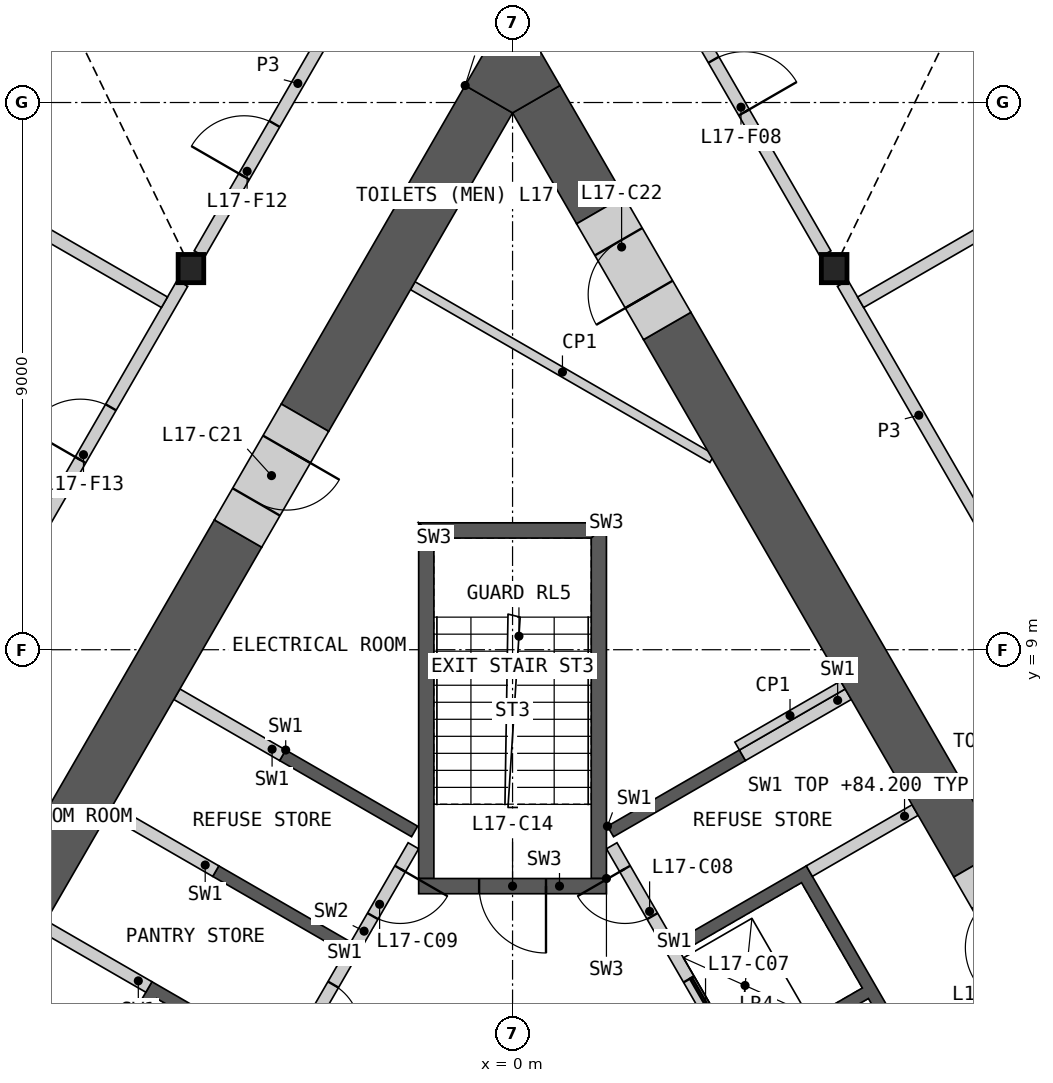
"""IFC4 building model, lengths in metres.
Left out: names, types, materials, properties, quantities, classifications, styles, units other than length and angle.
Written with IfcOpenShell. Run it as: python <this file> out.ifc"""

import sys

from ifc_helpers import new_model, si_unit, direction, frame, frame_2d, origin, origin_2d, place, context, subcontext, project, spatial, polyline, rectangle, i_section, outline, extrude, element, fill, save


model = new_model("IFC4")
c1 = context("Model", 3, precision=1e-05, world=origin(), true_north=direction((0.0, 1.0)))
c2 = subcontext(c1, "Body", "Model", "MODEL_VIEW")
j1 = project(units=[si_unit("LENGTHUNIT", "METRE"), si_unit("PLANEANGLEUNIT", "RADIAN")], contexts=[c1])
p1 = place(None, origin())
s1 = spatial("IfcSite", under=j1, at=p1, CompositionType="ELEMENT")
p2 = place(p1, origin())
s2 = spatial("IfcBuilding", under=s1, at=p2, CompositionType="ELEMENT")
p3 = place(p2, frame((0.0, 0.0, 80.4)))
s3 = spatial("IfcBuildingStorey", under=s2, at=p3, CompositionType="ELEMENT", Elevation=80.4)
for number, where, z_axis, x_axis in (
    (1, (-5.289, 15.269, 0.0), (0.0, 0.0, 1.0), (1.0, 0.0, 0.0)),
    (2, (5.289, 15.269, 0.0), (0.0, 0.0, 1.0), (1.0, 0.0, 0.0)),
):
    element("IfcColumn", number, at=place(p3, frame(where, z_axis=z_axis, x_axis=x_axis)), inside=s3, PredefinedType="COLUMN", context=c2, shape_type="SweptSolid", body=[
        extrude(i_section(OverallWidth=0.421, OverallDepth=0.465, WebThickness=0.045, FlangeThickness=0.072, at=origin_2d()), origin(), (0.0, 0.0, 1.0), 4.2),
    ])
p4 = place(p3, origin())
e3 = element("IfcWall", 3, at=p4, inside=s3, PredefinedType="SHEAR", context=c2, shape_type="SweptSolid", body=[
    extrude(outline(polyline([(1.561, 6.097), (3.731, 7.35), (3.831, 7.177), (1.66, 5.924), (1.561, 6.097)])), origin(), (0.0, 0.0, 1.0), 3.8),
])
p5 = place(p3, origin())
e4 = element("IfcWall", 4, at=p5, inside=s3, PredefinedType="SHEAR", context=c2, shape_type="SweptSolid", body=[
    extrude(outline(polyline([(2.66, 4.192), (4.831, 5.445), (8.231, -0.444), (6.061, -1.697), (5.96, -1.524), (7.952, -0.374), (6.952, 1.358), (4.96, 0.208), (4.861, 0.381), (6.852, 1.531), (5.852, 3.263), (3.861, 2.113), (3.76, 2.287), (5.752, 3.437), (4.752, 5.169), (2.76, 4.019), (2.66, 4.192)])), origin(), (0.0, 0.0, 1.0), 3.8),
])
p6 = place(p3, frame((5.817, -1.476, 0.0), z_axis=(0.0, 0.0, 1.0), x_axis=(-0.500002616675, 0.866023893041, 0.0)))
e5 = element("IfcWall", 5, at=p6, inside=s3, PredefinedType="SOLIDWALL", context=c2, shape_type="SweptSolid", body=[
    extrude(rectangle(XDim=8.373, YDim=0.2, at=frame_2d((4.187, 0.0))), origin(), (0.0, 0.0, 1.0), 3.8),
])
p7 = place(p6, frame((0.337, 0.0, 0.0)))
e6 = element("IfcOpeningElement", 6, at=p7, cuts=e5, PredefinedType="OPENING", context=c2, shape_type="SweptSolid", body=[
    extrude(rectangle(XDim=1.1, YDim=2.1, at=frame_2d((0.55, 1.05))), frame((0.0, 0.11, 0.0), z_axis=(0.0, -1.0, 0.0), x_axis=(1.0, 0.0, 0.0)), (0.0, 0.0, 1.0), 0.22),
])
p8 = place(p6, frame((2.537, 0.0, 0.0)))
e7 = element("IfcOpeningElement", 7, at=p8, cuts=e5, PredefinedType="OPENING", context=c2, shape_type="SweptSolid", body=[
    extrude(rectangle(XDim=1.1, YDim=2.1, at=frame_2d((0.55, 1.05))), frame((0.0, 0.11, 0.0), z_axis=(0.0, -1.0, 0.0), x_axis=(1.0, 0.0, 0.0)), (0.0, 0.0, 1.0), 0.22),
])
p9 = place(p6, frame((4.737, 0.0, 0.0)))
e8 = element("IfcOpeningElement", 8, at=p9, cuts=e5, PredefinedType="OPENING", context=c2, shape_type="SweptSolid", body=[
    extrude(rectangle(XDim=1.1, YDim=2.1, at=frame_2d((0.55, 1.05))), frame((0.0, 0.11, 0.0), z_axis=(0.0, -1.0, 0.0), x_axis=(1.0, 0.0, 0.0)), (0.0, 0.0, 1.0), 0.22),
])
p10 = place(p6, frame((7.037, 0.0, 0.0)))
e9 = element("IfcOpeningElement", 9, at=p10, cuts=e5, PredefinedType="OPENING", context=c2, shape_type="SweptSolid", body=[
    extrude(rectangle(XDim=0.9, YDim=2.1, at=frame_2d((0.45, 1.05))), frame((0.0, 0.11, 0.0), z_axis=(0.0, -1.0, 0.0), x_axis=(1.0, 0.0, 0.0)), (0.0, 0.0, 1.0), 0.22),
])
p11 = place(p3, frame((4.881, 5.358, 0.0), z_axis=(0.0, 0.0, 1.0), x_axis=(0.866035824272, 0.499981950752, 0.0)))
e10 = element("IfcWall", 10, at=p11, inside=s3, PredefinedType="SHEAR", context=c2, shape_type="SweptSolid", body=[
    extrude(rectangle(XDim=2.009, YDim=0.2, at=frame_2d((1.004, 0.0))), origin(), (0.0, 0.0, 1.0), 3.8),
])
p12 = place(p3, frame((3.781, 7.263, 0.0), z_axis=(0.0, 0.0, 1.0), x_axis=(0.865983199114, 0.50007309351, 0.0)))
e11 = element("IfcWall", 11, at=p12, inside=s3, PredefinedType="SHEAR", context=c2, shape_type="SweptSolid", body=[
    extrude(rectangle(XDim=2.009, YDim=0.2, at=frame_2d((1.004, 0.0))), origin(), (0.0, 0.0, 1.0), 3.8),
])
p13 = place(p3, origin())
e12 = element("IfcWall", 12, at=p13, inside=s3, PredefinedType="SHEAR", context=c2, shape_type="SweptSolid", body=[
    extrude(outline(polyline([(-4.96, 0.208), (-7.131, 1.461), (-5.931, 3.54), (-3.76, 2.287), (-3.861, 2.113), (-5.852, 3.263), (-6.852, 1.531), (-4.861, 0.381), (-4.96, 0.208)])), origin(), (0.0, 0.0, 1.0), 3.8),
])
p14 = place(p3, origin())
e13 = element("IfcWall", 13, at=p14, inside=s3, PredefinedType="SHEAR", context=c2, shape_type="SweptSolid", body=[
    extrude(outline(polyline([(-2.76, 4.019), (-4.931, 5.272), (-4.831, 5.445), (-2.66, 4.192), (-2.76, 4.019)])), origin(), (0.0, 0.0, 1.0), 3.8),
])
p15 = place(p3, origin())
e14 = element("IfcWall", 14, at=p15, inside=s3, PredefinedType="SHEAR", context=c2, shape_type="SweptSolid", body=[
    extrude(outline(polyline([(-3.731, 7.35), (-1.561, 6.097), (-1.66, 5.924), (-3.831, 7.177), (-3.731, 7.35)])), origin(), (0.0, 0.0, 1.0), 3.8),
])
p16 = place(p3, frame((-1.631, 5.776, 0.0), z_axis=(0.0, 0.0, 1.0), x_axis=(-0.499992876559, -0.866029516466, 0.0)))
e15 = element("IfcWall", 15, at=p16, inside=s3, PredefinedType="SOLIDWALL", context=c2, shape_type="SweptSolid", body=[
    extrude(rectangle(XDim=6.486, YDim=0.2, at=frame_2d((3.243, 0.0))), origin(), (0.0, 0.0, 1.0), 3.8),
])
p17 = place(p16, frame((0.437, 0.0, 0.0)))
e16 = element("IfcOpeningElement", 16, at=p17, cuts=e15, PredefinedType="OPENING", context=c2, shape_type="SweptSolid", body=[
    extrude(rectangle(XDim=0.9, YDim=2.1, at=frame_2d((0.45, 1.05))), frame((0.0, 0.11, 0.0), z_axis=(0.0, -1.0, 0.0), x_axis=(1.0, 0.0, 0.0)), (0.0, 0.0, 1.0), 0.22),
])
p18 = place(p16, frame((2.637, 0.0, 0.0)))
e17 = element("IfcOpeningElement", 17, at=p18, cuts=e15, PredefinedType="OPENING", context=c2, shape_type="SweptSolid", body=[
    extrude(rectangle(XDim=0.9, YDim=2.1, at=frame_2d((0.45, 1.05))), frame((0.0, 0.11, 0.0), z_axis=(0.0, -1.0, 0.0), x_axis=(1.0, 0.0, 0.0)), (0.0, 0.0, 1.0), 0.22),
])
p19 = place(p3, frame((-3.781, 7.263, 0.0), z_axis=(0.0, 0.0, 1.0), x_axis=(-0.865983199114, 0.50007309351, 0.0)))
e18 = element("IfcWall", 18, at=p19, inside=s3, PredefinedType="SHEAR", context=c2, shape_type="SweptSolid", body=[
    extrude(rectangle(XDim=2.009, YDim=0.2, at=frame_2d((1.004, 0.0))), origin(), (0.0, 0.0, 1.0), 3.8),
])
p20 = place(p3, frame((-4.881, 5.358, 0.0), z_axis=(0.0, 0.0, 1.0), x_axis=(-0.866035824272, 0.499981950752, 0.0)))
e19 = element("IfcWall", 19, at=p20, inside=s3, PredefinedType="SHEAR", context=c2, shape_type="SweptSolid", body=[
    extrude(rectangle(XDim=2.009, YDim=0.2, at=frame_2d((1.004, 0.0))), origin(), (0.0, 0.0, 1.0), 3.8),
])
p21 = place(p3, frame((-5.981, 3.453, 0.0), z_axis=(0.0, 0.0, 1.0), x_axis=(-0.866013584312, 0.500020471368, 0.0)))
e20 = element("IfcWall", 20, at=p21, inside=s3, PredefinedType="SHEAR", context=c2, shape_type="SweptSolid", body=[
    extrude(rectangle(XDim=2.009, YDim=0.2, at=frame_2d((1.005, 0.0))), origin(), (0.0, 0.0, 1.0), 3.8),
])
p22 = place(p3, origin())
e21 = element("IfcWall", 21, at=p22, inside=s3, PredefinedType="SHEAR", context=c2, shape_type="SweptSolid", body=[
    extrude(outline(polyline([(1.544, 5.237), (1.544, 11.087), (1.294, 10.837), (1.294, 5.237), (1.544, 5.237)])), origin(), (0.0, 0.0, 1.0), 3.8),
])
p23 = place(p3, origin())
e22 = element("IfcWall", 22, at=p23, inside=s3, PredefinedType="SHEAR", context=c2, shape_type="SweptSolid", body=[
    extrude(outline(polyline([(1.544, 11.087), (-1.544, 11.087), (-1.294, 10.837), (1.294, 10.837), (1.544, 11.087)])), origin(), (0.0, 0.0, 1.0), 3.8),
])
p24 = place(p3, origin())
e23 = element("IfcWall", 23, at=p24, inside=s3, PredefinedType="SHEAR", context=c2, shape_type="SweptSolid", body=[
    extrude(outline(polyline([(-1.294, 10.837), (-1.544, 11.087), (-1.544, 5.237), (-1.294, 5.237), (-1.294, 10.837)])), origin(), (0.0, 0.0, 1.0), 3.8),
])
p25 = place(p3, frame((1.544, 5.112, 0.0), z_axis=(0.0, 0.0, 1.0), x_axis=(-1.0, 0.0, 0.0)))
e24 = element("IfcWall", 24, at=p25, inside=s3, PredefinedType="SHEAR", context=c2, shape_type="SweptSolid", body=[
    extrude(rectangle(XDim=3.088, YDim=0.25, at=frame_2d((1.544, 0.0))), origin(), (0.0, 0.0, 1.0), 3.8),
])
p26 = place(p25, frame((0.994, 0.0, 0.0)))
e25 = element("IfcOpeningElement", 25, at=p26, cuts=e24, PredefinedType="OPENING", context=c2, shape_type="SweptSolid", body=[
    extrude(rectangle(XDim=1.1, YDim=2.1, at=frame_2d((0.55, 1.05))), frame((0.0, 0.135, 0.0), z_axis=(0.0, -1.0, 0.0), x_axis=(1.0, 0.0, 0.0)), (0.0, 0.0, 1.0), 0.27),
])
p27 = place(p3, frame((3.693, 7.415, 0.0), z_axis=(0.0, 0.0, 1.0), x_axis=(0.866035824272, 0.499981950752, 0.0)))
e26 = element("IfcWall", 26, at=p27, inside=s3, PredefinedType="PARTITIONING", context=c2, shape_type="SweptSolid", body=[
    extrude(rectangle(XDim=2.009, YDim=0.15, at=frame_2d((1.004, 0.0))), origin(), (0.0, 0.0, 1.0), 3.8),
])
p28 = place(p3, frame((-1.641, 14.987, 0.0), z_axis=(0.0, 0.0, 1.0), x_axis=(0.866033267067, -0.499986380149, 0.0)))
e27 = element("IfcWall", 27, at=p28, inside=s3, PredefinedType="PARTITIONING", context=c2, shape_type="SweptSolid", body=[
    extrude(rectangle(XDim=5.685, YDim=0.15, at=frame_2d((2.843, 0.0))), origin(), (0.0, 0.0, 1.0), 3.8),
])
p29 = place(p3, frame((7.646, 5.486, 0.0), z_axis=(0.0, 0.0, 1.0), x_axis=(-0.499982660725, 0.866035414388, 0.0)))
e28 = element("IfcWall", 28, at=p29, inside=s3, PredefinedType="SHEAR", context=c2, shape_type="SweptSolid", body=[
    extrude(rectangle(XDim=10.206, YDim=0.9, at=frame_2d((5.103, 0.0))), origin(), (0.0, 0.0, 1.0), 3.8),
])
p30 = place(p3, frame((1.443, 16.23, 0.0), z_axis=(0.0, 0.0, 1.0), x_axis=(-0.500026652407, 0.866010015463, 0.0)))
e29 = element("IfcWall", 29, at=p30, inside=s3, PredefinedType="SHEAR", context=c2, shape_type="SweptSolid", body=[
    extrude(rectangle(XDim=2.107, YDim=0.9, at=frame_2d((1.054, 0.0))), origin(), (0.0, 0.0, 1.0), 3.8),
])
p31 = place(p3, frame((-4.514, 10.911, 0.0), z_axis=(0.0, 0.0, 1.0), x_axis=(-0.500006662879, -0.866021556935, 0.0)))
e30 = element("IfcWall", 30, at=p31, inside=s3, PredefinedType="SHEAR", context=c2, shape_type="SweptSolid", body=[
    extrude(rectangle(XDim=7.312, YDim=0.9, at=frame_2d((3.656, 0.0))), origin(), (0.0, 0.0, 1.0), 3.8),
])
p32 = place(p3, frame((-0.39, 18.055, 0.0), z_axis=(0.0, 0.0, 1.0), x_axis=(-0.500006596359, -0.866021595341, 0.0)))
e31 = element("IfcWall", 31, at=p32, inside=s3, PredefinedType="SHEAR", context=c2, shape_type="SweptSolid", body=[
    extrude(rectangle(XDim=6.049, YDim=0.9, at=frame_2d((3.025, 0.0))), origin(), (0.0, 0.0, 1.0), 3.8),
])
p33 = place(p3, origin())
e32 = element("IfcWall", 32, at=p33, inside=s3, PredefinedType="SHEAR", context=c2, shape_type="SweptSolid", body=[
    extrude(outline(polyline([(-0.779, 18.28), (0.0, 19.63), (0.779, 18.28), (0.0, 17.83), (-0.779, 18.28)])), origin(), (0.0, 0.0, 1.0), 3.8),
])
p34 = place(p3, frame((8.747, 3.58, 0.0), z_axis=(0.0, 0.0, 1.0), x_axis=(-0.50002983664, 0.866008176907, 0.0)))
e33 = element("IfcWall", 33, at=p34, inside=s3, PredefinedType="SHEAR", context=c2, shape_type="SweptSolid", body=[
    extrude(rectangle(XDim=2.2, YDim=0.9, at=frame_2d((1.1, 0.0))), origin(), (0.0, 0.0, 1.0), 3.8),
])
p35 = place(p34, frame((0.6, 0.0, 0.0)))
e34 = element("IfcOpeningElement", 34, at=p35, cuts=e33, PredefinedType="OPENING", context=c2, shape_type="SweptSolid", body=[
    extrude(rectangle(XDim=1.0, YDim=2.1, at=frame_2d((0.5, 1.05))), frame((0.0, 0.46, 0.0), z_axis=(0.0, -1.0, 0.0), x_axis=(1.0, 0.0, 0.0)), (0.0, 0.0, 1.0), 0.92),
])
p36 = place(p3, frame((-3.414, 12.816, 0.0), z_axis=(0.0, 0.0, 1.0), x_axis=(-0.50002983664, -0.866008176907, 0.0)))
e35 = element("IfcWall", 35, at=p36, inside=s3, PredefinedType="SHEAR", context=c2, shape_type="SweptSolid", body=[
    extrude(rectangle(XDim=2.2, YDim=0.9, at=frame_2d((1.1, 0.0))), origin(), (0.0, 0.0, 1.0), 3.8),
])
p37 = place(p36, frame((0.6, 0.0, 0.0)))
e36 = element("IfcOpeningElement", 36, at=p37, cuts=e35, PredefinedType="OPENING", context=c2, shape_type="SweptSolid", body=[
    extrude(rectangle(XDim=1.0, YDim=2.1, at=frame_2d((0.5, 1.05))), frame((0.0, 0.46, 0.0), z_axis=(0.0, -1.0, 0.0), x_axis=(1.0, 0.0, 0.0)), (0.0, 0.0, 1.0), 0.92),
])
p38 = place(p3, frame((2.543, 14.325, 0.0), z_axis=(0.0, 0.0, 1.0), x_axis=(-0.50002983664, 0.866008176907, 0.0)))
e37 = element("IfcWall", 37, at=p38, inside=s3, PredefinedType="SHEAR", context=c2, shape_type="SweptSolid", body=[
    extrude(rectangle(XDim=2.2, YDim=0.9, at=frame_2d((1.1, 0.0))), origin(), (0.0, 0.0, 1.0), 3.8),
])
p39 = place(p38, frame((0.6, 0.0, 0.0)))
e38 = element("IfcOpeningElement", 38, at=p39, cuts=e37, PredefinedType="OPENING", context=c2, shape_type="SweptSolid", body=[
    extrude(rectangle(XDim=1.0, YDim=2.1, at=frame_2d((0.5, 1.05))), frame((0.0, 0.46, 0.0), z_axis=(0.0, -1.0, 0.0), x_axis=(1.0, 0.0, 0.0)), (0.0, 0.0, 1.0), 0.92),
])
p40 = place(p3, frame((5.429, 15.026, 0.0), z_axis=(0.0, 0.0, 1.0), x_axis=(0.50001002959, -0.86601961312, 0.0)))
e39 = element("IfcWall", 39, at=p40, inside=s3, PredefinedType="PARTITIONING", context=c2, shape_type="SweptSolid", body=[
    extrude(rectangle(XDim=10.019, YDim=0.2, at=frame_2d((5.009, 0.0))), origin(), (0.0, 0.0, 1.0), 3.8),
])
p41 = place(p40, frame((4.76, 0.0, 0.0)))
e40 = element("IfcOpeningElement", 40, at=p41, cuts=e39, PredefinedType="OPENING", context=c2, shape_type="SweptSolid", body=[
    extrude(rectangle(XDim=1.0, YDim=2.1, at=frame_2d((0.5, 1.05))), frame((0.0, 0.11, 0.0), z_axis=(0.0, -1.0, 0.0), x_axis=(1.0, 0.0, 0.0)), (0.0, 0.0, 1.0), 0.22),
])
p42 = place(p3, frame((-10.439, 6.35, 0.0), z_axis=(0.0, 0.0, 1.0), x_axis=(0.50001002959, 0.86601961312, 0.0)))
e41 = element("IfcWall", 41, at=p42, inside=s3, PredefinedType="PARTITIONING", context=c2, shape_type="SweptSolid", body=[
    extrude(rectangle(XDim=10.019, YDim=0.2, at=frame_2d((5.009, 0.0))), origin(), (0.0, 0.0, 1.0), 3.8),
])
p43 = place(p42, frame((6.664, 0.0, 0.0)))
e42 = element("IfcOpeningElement", 42, at=p43, cuts=e41, PredefinedType="OPENING", context=c2, shape_type="SweptSolid", body=[
    extrude(rectangle(XDim=1.0, YDim=2.1, at=frame_2d((0.5, 1.05))), frame((0.0, 0.11, 0.0), z_axis=(0.0, -1.0, 0.0), x_axis=(1.0, 0.0, 0.0)), (0.0, 0.0, 1.0), 0.22),
])
p44 = place(p42, frame((1.854, 0.0, 0.0)))
e43 = element("IfcOpeningElement", 43, at=p44, cuts=e41, PredefinedType="OPENING", context=c2, shape_type="SweptSolid", body=[
    extrude(rectangle(XDim=1.0, YDim=2.1, at=frame_2d((0.5, 1.05))), frame((0.0, 0.11, 0.0), z_axis=(0.0, -1.0, 0.0), x_axis=(1.0, 0.0, 0.0)), (0.0, 0.0, 1.0), 0.22),
])
p45 = place(p3, frame((1.913, 21.116, 0.0), z_axis=(0.0, 0.0, 1.0), x_axis=(0.500001069878, -0.866024786089, 0.0)))
e44 = element("IfcWall", 44, at=p45, inside=s3, PredefinedType="PARTITIONING", context=c2, shape_type="SweptSolid", body=[
    extrude(rectangle(XDim=6.473, YDim=0.2, at=frame_2d((3.236, 0.0))), origin(), (0.0, 0.0, 1.0), 3.8),
])
p46 = place(p45, frame((2.787, 0.0, 0.0)))
e45 = element("IfcOpeningElement", 45, at=p46, cuts=e44, PredefinedType="OPENING", context=c2, shape_type="SweptSolid", body=[
    extrude(rectangle(XDim=1.0, YDim=2.1, at=frame_2d((0.5, 1.05))), frame((0.0, 0.11, 0.0), z_axis=(0.0, -1.0, 0.0), x_axis=(1.0, 0.0, 0.0)), (0.0, 0.0, 1.0), 0.22),
])
p47 = place(p3, frame((-5.149, 15.511, 0.0), z_axis=(0.0, 0.0, 1.0), x_axis=(0.500001069878, 0.866024786089, 0.0)))
e46 = element("IfcWall", 46, at=p47, inside=s3, PredefinedType="PARTITIONING", context=c2, shape_type="SweptSolid", body=[
    extrude(rectangle(XDim=6.473, YDim=0.2, at=frame_2d((3.236, 0.0))), origin(), (0.0, 0.0, 1.0), 3.8),
])
p48 = place(p47, frame((4.715, 0.0, 0.0)))
e47 = element("IfcOpeningElement", 47, at=p48, cuts=e46, PredefinedType="OPENING", context=c2, shape_type="SweptSolid", body=[
    extrude(rectangle(XDim=1.0, YDim=2.1, at=frame_2d((0.5, 1.05))), frame((0.0, 0.11, 0.0), z_axis=(0.0, -1.0, 0.0), x_axis=(1.0, 0.0, 0.0)), (0.0, 0.0, 1.0), 0.22),
])
p49 = place(p47, frame((1.468, 0.0, 0.0)))
e48 = element("IfcOpeningElement", 48, at=p49, cuts=e46, PredefinedType="OPENING", context=c2, shape_type="SweptSolid", body=[
    extrude(rectangle(XDim=1.0, YDim=2.1, at=frame_2d((0.5, 1.05))), frame((0.0, 0.11, 0.0), z_axis=(0.0, -1.0, 0.0), x_axis=(1.0, 0.0, 0.0)), (0.0, 0.0, 1.0), 0.22),
])
for number, where, z_axis, x_axis in (
    (49, (5.725, 14.715, 0.0), (0.0, 0.0, 1.0), (0.866, 0.5, 0.0)),
    (50, (-16.981, 21.213, 0.0), (0.0, 0.0, 1.0), (0.866, -0.5, 0.0)),
):
    element("IfcWall", number, at=place(p3, frame(where, z_axis=z_axis, x_axis=x_axis)), inside=s3, PredefinedType="PARTITIONING", context=c2, shape_type="SweptSolid", body=[
        extrude(rectangle(XDim=12.998, YDim=0.2, at=frame_2d((6.499, 0.0))), origin(), (0.0, 0.0, 1.0), 2.885),
    ])
p50 = place(p9, origin())
e51 = element("IfcDoor", 51, at=p50, inside=s3, OperationType="SLIDING_TO_LEFT", PredefinedType="DOOR", context=c2, shape_type="SweptSolid", body=[
    extrude(rectangle(XDim=1.1, YDim=2.1, at=frame_2d((0.55, 1.05))), frame((0.0, 0.025, 0.0), z_axis=(0.0, -1.0, 0.0), x_axis=(1.0, 0.0, 0.0)), (0.0, 0.0, 1.0), 0.05),
])
fill(e8, e51)
p51 = place(p10, origin())
e52 = element("IfcDoor", 52, at=p51, inside=s3, OperationType="SINGLE_SWING_RIGHT", PredefinedType="DOOR", context=c2, shape_type="SweptSolid", body=[
    extrude(rectangle(XDim=0.9, YDim=2.1, at=frame_2d((0.45, 1.05))), frame((0.0, 0.025, 0.0), z_axis=(0.0, -1.0, 0.0), x_axis=(1.0, 0.0, 0.0)), (0.0, 0.0, 1.0), 0.05),
])
fill(e9, e52)
p52 = place(p17, origin())
e53 = element("IfcDoor", 53, at=p52, inside=s3, OperationType="SINGLE_SWING_LEFT", PredefinedType="DOOR", context=c2, shape_type="SweptSolid", body=[
    extrude(rectangle(XDim=0.9, YDim=2.1, at=frame_2d((0.45, 1.05))), frame((0.0, 0.025, 0.0), z_axis=(0.0, -1.0, 0.0), x_axis=(1.0, 0.0, 0.0)), (0.0, 0.0, 1.0), 0.05),
])
fill(e16, e53)
p53 = place(p18, origin())
e54 = element("IfcDoor", 54, at=p53, inside=s3, OperationType="SINGLE_SWING_RIGHT", PredefinedType="DOOR", context=c2, shape_type="SweptSolid", body=[
    extrude(rectangle(XDim=0.9, YDim=2.1, at=frame_2d((0.45, 1.05))), frame((0.0, 0.025, 0.0), z_axis=(0.0, -1.0, 0.0), x_axis=(1.0, 0.0, 0.0)), (0.0, 0.0, 1.0), 0.05),
])
fill(e17, e54)
p54 = place(p26, origin())
e55 = element("IfcDoor", 55, at=p54, inside=s3, OperationType="SINGLE_SWING_LEFT", PredefinedType="DOOR", context=c2, shape_type="SweptSolid", body=[
    extrude(rectangle(XDim=1.1, YDim=2.1, at=frame_2d((0.55, 1.05))), frame((0.0, 0.025, 0.0), z_axis=(0.0, -1.0, 0.0), x_axis=(1.0, 0.0, 0.0)), (0.0, 0.0, 1.0), 0.05),
])
fill(e25, e55)
p55 = place(p37, origin())
e56 = element("IfcDoor", 56, at=p55, inside=s3, OperationType="SINGLE_SWING_LEFT", PredefinedType="DOOR", context=c2, shape_type="SweptSolid", body=[
    extrude(rectangle(XDim=1.0, YDim=2.1, at=frame_2d((0.5, 1.05))), frame((0.0, 0.205, 0.0), z_axis=(0.0, -1.0, 0.0), x_axis=(1.0, 0.0, 0.0)), (0.0, 0.0, 1.0), 0.05),
])
fill(e36, e56)
p56 = place(p39, origin())
e57 = element("IfcDoor", 57, at=p56, inside=s3, OperationType="SINGLE_SWING_LEFT", PredefinedType="DOOR", context=c2, shape_type="SweptSolid", body=[
    extrude(rectangle(XDim=1.0, YDim=2.1, at=frame_2d((0.5, 1.05))), frame((0.0, 0.205, 0.0), z_axis=(0.0, -1.0, 0.0), x_axis=(1.0, 0.0, 0.0)), (0.0, 0.0, 1.0), 0.05),
])
fill(e38, e57)
p57 = place(p46, origin())
e58 = element("IfcDoor", 58, at=p57, inside=s3, OperationType="SINGLE_SWING_RIGHT", PredefinedType="DOOR", context=c2, shape_type="SweptSolid", body=[
    extrude(rectangle(XDim=1.0, YDim=2.1, at=frame_2d((0.5, 1.05))), frame((0.0, 0.025, 0.0), z_axis=(0.0, -1.0, 0.0), x_axis=(1.0, 0.0, 0.0)), (0.0, 0.0, 1.0), 0.05),
])
fill(e45, e58)
p58 = place(p49, origin())
e59 = element("IfcDoor", 59, at=p58, inside=s3, OperationType="SINGLE_SWING_LEFT", PredefinedType="DOOR", context=c2, shape_type="SweptSolid", body=[
    extrude(rectangle(XDim=1.0, YDim=2.1, at=frame_2d((0.5, 1.05))), frame((0.0, 0.025, 0.0), z_axis=(0.0, -1.0, 0.0), x_axis=(1.0, 0.0, 0.0)), (0.0, 0.0, 1.0), 0.05),
])
fill(e48, e59)
p59 = place(p43, origin())
e60 = element("IfcDoor", 60, at=p59, inside=s3, OperationType="SINGLE_SWING_LEFT", PredefinedType="DOOR", context=c2, shape_type="SweptSolid", body=[
    extrude(rectangle(XDim=1.0, YDim=2.1, at=frame_2d((0.5, 1.05))), frame((0.0, 0.025, 0.0), z_axis=(0.0, -1.0, 0.0), x_axis=(1.0, 0.0, 0.0)), (0.0, 0.0, 1.0), 0.05),
])
fill(e42, e60)
save(model, sys.argv[1])
